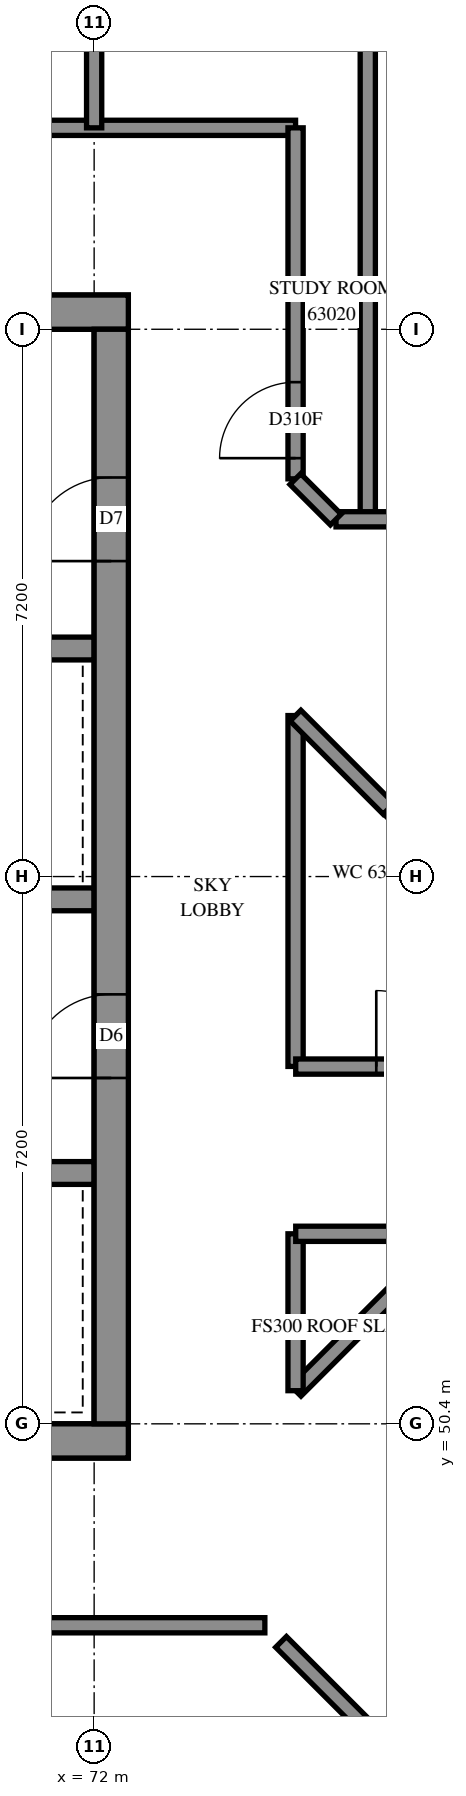
"""IFC4 building model, lengths in metres.
Left out: names, types, materials, properties, quantities, classifications, styles, units other than length and angle.
Written with IfcOpenShell. Run it as: python <this file> out.ifc"""

import sys

from ifc_helpers import new_model, si_unit, direction, frame, frame_2d, origin, place, context, subcontext, project, spatial, rectangle, extrude, element, fill, save


model = new_model("IFC4")
c1 = context("Model", 3, precision=1e-05, world=origin(), true_north=direction((0.0, 1.0)))
c2 = subcontext(c1, "Body", "Model", "MODEL_VIEW")
j1 = project(units=[si_unit("LENGTHUNIT", "METRE"), si_unit("PLANEANGLEUNIT", "RADIAN")], contexts=[c1])
p1 = place(None, origin())
s1 = spatial("IfcSite", under=j1, at=p1, CompositionType="ELEMENT")
p2 = place(p1, origin())
s2 = spatial("IfcBuilding", under=s1, at=p2, CompositionType="ELEMENT")
p3 = place(p2, frame((0.0, 0.0, 230.4)))
s3 = spatial("IfcBuildingStorey", under=s2, at=p3, CompositionType="ELEMENT", Elevation=230.4)
p4 = place(p3, frame((57.15, 50.175, -0.3), z_axis=(0.0, 0.0, 1.0), x_axis=(1.0, 0.0, 0.0)))
e1 = element("IfcWall", 1, at=p4, inside=s3, PredefinedType="SHEAR", context=c2, shape_type="SweptSolid", body=[
    extrude(rectangle(XDim=15.3, YDim=0.45, at=frame_2d((7.65, 0.0))), origin(), (0.0, 0.0, 1.0), 3.5),
])
p5 = place(p3, frame((57.15, 65.025, -0.3), z_axis=(0.0, 0.0, 1.0), x_axis=(1.0, 0.0, 0.0)))
e2 = element("IfcWall", 2, at=p5, inside=s3, PredefinedType="SHEAR", context=c2, shape_type="SweptSolid", body=[
    extrude(rectangle(XDim=15.3, YDim=0.45, at=frame_2d((7.65, 0.0))), origin(), (0.0, 0.0, 1.0), 3.5),
])
p6 = place(p5, frame((10.45, 0.0, 0.3)))
e3 = element("IfcOpeningElement", 3, at=p6, cuts=e2, PredefinedType="OPENING", context=c2, shape_type="SweptSolid", body=[
    extrude(rectangle(XDim=0.8, YDim=2.1, at=frame_2d((0.4, 1.05))), frame((0.0, 0.235, 0.0), z_axis=(0.0, -1.0, 0.0), x_axis=(1.0, 0.0, 0.0)), (0.0, 0.0, 1.0), 0.47),
])
p7 = place(p3, frame((72.225, 50.4, -0.3), z_axis=(0.0, 0.0, 1.0), x_axis=(0.0, 1.0, 0.0)))
e4 = element("IfcWall", 4, at=p7, inside=s3, PredefinedType="SHEAR", context=c2, shape_type="SweptSolid", body=[
    extrude(rectangle(XDim=14.4, YDim=0.45, at=frame_2d((7.2, 0.0))), origin(), (0.0, 0.0, 1.0), 3.5),
])
p8 = place(p7, frame((4.55, 0.0, 0.3)))
e5 = element("IfcOpeningElement", 5, at=p8, cuts=e4, PredefinedType="OPENING", context=c2, shape_type="SweptSolid", body=[
    extrude(rectangle(XDim=1.1, YDim=2.1, at=frame_2d((0.55, 1.05))), frame((0.0, 0.235, 0.0), z_axis=(0.0, -1.0, 0.0), x_axis=(1.0, 0.0, 0.0)), (0.0, 0.0, 1.0), 0.47),
])
p9 = place(p7, frame((11.35, 0.0, 0.3)))
e6 = element("IfcOpeningElement", 6, at=p9, cuts=e4, PredefinedType="OPENING", context=c2, shape_type="SweptSolid", body=[
    extrude(rectangle(XDim=1.1, YDim=2.1, at=frame_2d((0.55, 1.05))), frame((0.0, 0.235, 0.0), z_axis=(0.0, -1.0, 0.0), x_axis=(1.0, 0.0, 0.0)), (0.0, 0.0, 1.0), 0.47),
])
p10 = place(p3, frame((57.6, 53.7, 0.0), z_axis=(0.0, 0.0, 1.0), x_axis=(1.0, 0.0, 0.0)))
e7 = element("IfcWall", 7, at=p10, inside=s3, PredefinedType="SOLIDWALL", context=c2, shape_type="SweptSolid", body=[
    extrude(rectangle(XDim=14.4, YDim=0.3, at=frame_2d((7.2, 0.0))), origin(), (0.0, 0.0, 1.0), 3.9),
])
p11 = place(p10, frame((1.35, 0.0, 0.0)))
e8 = element("IfcOpeningElement", 8, at=p11, cuts=e7, PredefinedType="OPENING", context=c2, shape_type="SweptSolid", body=[
    extrude(rectangle(XDim=0.9, YDim=2.1, at=frame_2d((0.45, 1.05))), frame((0.0, 0.16, 0.0), z_axis=(0.0, -1.0, 0.0), x_axis=(1.0, 0.0, 0.0)), (0.0, 0.0, 1.0), 0.32),
])
p12 = place(p10, frame((4.95, 0.0, 0.0)))
e9 = element("IfcOpeningElement", 9, at=p12, cuts=e7, PredefinedType="OPENING", context=c2, shape_type="SweptSolid", body=[
    extrude(rectangle(XDim=0.9, YDim=2.1, at=frame_2d((0.45, 1.05))), frame((0.0, 0.16, 0.0), z_axis=(0.0, -1.0, 0.0), x_axis=(1.0, 0.0, 0.0)), (0.0, 0.0, 1.0), 0.32),
])
p13 = place(p10, frame((8.55, 0.0, 0.0)))
e10 = element("IfcOpeningElement", 10, at=p13, cuts=e7, PredefinedType="OPENING", context=c2, shape_type="SweptSolid", body=[
    extrude(rectangle(XDim=0.9, YDim=2.1, at=frame_2d((0.45, 1.05))), frame((0.0, 0.16, 0.0), z_axis=(0.0, -1.0, 0.0), x_axis=(1.0, 0.0, 0.0)), (0.0, 0.0, 1.0), 0.32),
])
p14 = place(p10, frame((12.05, 0.0, 0.0)))
e11 = element("IfcOpeningElement", 11, at=p14, cuts=e7, PredefinedType="OPENING", context=c2, shape_type="SweptSolid", body=[
    extrude(rectangle(XDim=1.1, YDim=2.1, at=frame_2d((0.55, 1.05))), frame((0.0, 0.16, 0.0), z_axis=(0.0, -1.0, 0.0), x_axis=(1.0, 0.0, 0.0)), (0.0, 0.0, 1.0), 0.32),
])
p15 = place(p3, frame((57.6, 57.3, 0.0), z_axis=(0.0, 0.0, 1.0), x_axis=(1.0, 0.0, 0.0)))
e12 = element("IfcWall", 12, at=p15, inside=s3, PredefinedType="SOLIDWALL", context=c2, shape_type="SweptSolid", body=[
    extrude(rectangle(XDim=14.4, YDim=0.3, at=frame_2d((7.2, 0.0))), origin(), (0.0, 0.0, 1.0), 3.9),
])
p16 = place(p15, frame((1.25, 0.0, 0.0)))
e13 = element("IfcOpeningElement", 13, at=p16, cuts=e12, PredefinedType="OPENING", context=c2, shape_type="SweptSolid", body=[
    extrude(rectangle(XDim=1.1, YDim=2.1, at=frame_2d((0.55, 1.05))), frame((0.0, 0.16, 0.0), z_axis=(0.0, -1.0, 0.0), x_axis=(1.0, 0.0, 0.0)), (0.0, 0.0, 1.0), 0.32),
])
p17 = place(p15, frame((4.85, 0.0, 0.0)))
e14 = element("IfcOpeningElement", 14, at=p17, cuts=e12, PredefinedType="OPENING", context=c2, shape_type="SweptSolid", body=[
    extrude(rectangle(XDim=1.1, YDim=2.1, at=frame_2d((0.55, 1.05))), frame((0.0, 0.16, 0.0), z_axis=(0.0, -1.0, 0.0), x_axis=(1.0, 0.0, 0.0)), (0.0, 0.0, 1.0), 0.32),
])
p18 = place(p15, frame((8.45, 0.0, 0.0)))
e15 = element("IfcOpeningElement", 15, at=p18, cuts=e12, PredefinedType="OPENING", context=c2, shape_type="SweptSolid", body=[
    extrude(rectangle(XDim=1.1, YDim=2.1, at=frame_2d((0.55, 1.05))), frame((0.0, 0.16, 0.0), z_axis=(0.0, -1.0, 0.0), x_axis=(1.0, 0.0, 0.0)), (0.0, 0.0, 1.0), 0.32),
])
p19 = place(p15, frame((12.05, 0.0, 0.0)))
e16 = element("IfcOpeningElement", 16, at=p19, cuts=e12, PredefinedType="OPENING", context=c2, shape_type="SweptSolid", body=[
    extrude(rectangle(XDim=1.1, YDim=2.1, at=frame_2d((0.55, 1.05))), frame((0.0, 0.16, 0.0), z_axis=(0.0, -1.0, 0.0), x_axis=(1.0, 0.0, 0.0)), (0.0, 0.0, 1.0), 0.32),
])
p20 = place(p3, frame((64.8, 60.6, 0.0), z_axis=(0.0, 0.0, 1.0), x_axis=(1.0, 0.0, 0.0)))
e17 = element("IfcWall", 17, at=p20, inside=s3, PredefinedType="SOLIDWALL", context=c2, shape_type="SweptSolid", body=[
    extrude(rectangle(XDim=7.2, YDim=0.3, at=frame_2d((3.6, 0.0))), origin(), (0.0, 0.0, 1.0), 3.9),
])
p21 = place(p3, frame((54.95, 67.45, 0.0), z_axis=(0.0, 0.0, 1.0), x_axis=(1.0, 0.0, 0.0)))
e18 = element("IfcWall", 18, at=p21, inside=s3, PredefinedType="PARTITIONING", context=c2, shape_type="SweptSolid", body=[
    extrude(rectangle(XDim=19.7, YDim=0.2, at=frame_2d((9.85, 0.0))), origin(), (0.0, 0.0, 1.0), 3.9),
])
p22 = place(p21, frame((6.513, 0.0, 0.0)))
e19 = element("IfcOpeningElement", 19, at=p22, cuts=e18, PredefinedType="OPENING", context=c2, shape_type="SweptSolid", body=[
    extrude(rectangle(XDim=1.0, YDim=2.1, at=frame_2d((0.5, 1.05))), frame((0.0, 0.11, 0.0), z_axis=(0.0, -1.0, 0.0), x_axis=(1.0, 0.0, 0.0)), (0.0, 0.0, 1.0), 0.22),
])
p23 = place(p21, frame((13.713, 0.0, 0.0)))
e20 = element("IfcOpeningElement", 20, at=p23, cuts=e18, PredefinedType="OPENING", context=c2, shape_type="SweptSolid", body=[
    extrude(rectangle(XDim=1.0, YDim=2.1, at=frame_2d((0.5, 1.05))), frame((0.0, 0.11, 0.0), z_axis=(0.0, -1.0, 0.0), x_axis=(1.0, 0.0, 0.0)), (0.0, 0.0, 1.0), 0.22),
])
p24 = place(p3, frame((54.95, 47.75, 0.0), z_axis=(0.0, 0.0, 1.0), x_axis=(1.0, 0.0, 0.0)))
e21 = element("IfcWall", 21, at=p24, inside=s3, PredefinedType="PARTITIONING", context=c2, shape_type="SweptSolid", body=[
    extrude(rectangle(XDim=19.296, YDim=0.2, at=frame_2d((9.648, 0.0))), origin(), (0.0, 0.0, 1.0), 3.9),
])
p25 = place(p24, frame((11.997, 0.0, 0.0)))
e22 = element("IfcOpeningElement", 22, at=p25, cuts=e21, PredefinedType="OPENING", context=c2, shape_type="SweptSolid", body=[
    extrude(rectangle(XDim=1.0, YDim=2.1, at=frame_2d((0.5, 1.05))), frame((0.0, 0.11, 0.0), z_axis=(0.0, -1.0, 0.0), x_axis=(1.0, 0.0, 0.0)), (0.0, 0.0, 1.0), 0.22),
])
p26 = place(p3, frame((75.6, 62.3, 0.0), z_axis=(0.0, 0.0, 1.0), x_axis=(0.0, 1.0, 0.0)))
e23 = element("IfcWall", 23, at=p26, inside=s3, PredefinedType="PARTITIONING", context=c2, shape_type="SweptSolid", body=[
    extrude(rectangle(XDim=6.57, YDim=0.2, at=frame_2d((3.285, 0.0))), origin(), (0.0, 0.0, 1.0), 3.9),
])
p27 = place(p3, frame((74.65, 62.832, 0.0), z_axis=(0.0, 0.0, 1.0), x_axis=(0.0, 1.0, 0.0)))
e24 = element("IfcWall", 24, at=p27, inside=s3, PredefinedType="PARTITIONING", context=c2, shape_type="SweptSolid", body=[
    extrude(rectangle(XDim=4.618, YDim=0.2, at=frame_2d((2.309, 0.0))), origin(), (0.0, 0.0, 1.0), 3.9),
])
p28 = place(p27, frame((0.272, 0.0, 0.0)))
e25 = element("IfcOpeningElement", 25, at=p28, cuts=e24, PredefinedType="OPENING", context=c2, shape_type="SweptSolid", body=[
    extrude(rectangle(XDim=1.0, YDim=2.1, at=frame_2d((0.5, 1.05))), frame((0.0, 0.11, 0.0), z_axis=(0.0, -1.0, 0.0), x_axis=(1.0, 0.0, 0.0)), (0.0, 0.0, 1.0), 0.22),
])
p29 = place(p3, frame((74.65, 55.102, 0.0), z_axis=(0.0, 0.0, 1.0), x_axis=(0.0, 1.0, 0.0)))
e26 = element("IfcWall", 26, at=p29, inside=s3, PredefinedType="PARTITIONING", context=c2, shape_type="SweptSolid", body=[
    extrude(rectangle(XDim=4.616, YDim=0.2, at=frame_2d((2.308, 0.0))), origin(), (0.0, 0.0, 1.0), 3.9),
])
p30 = place(p3, frame((74.652, 55.1, 0.0), z_axis=(0.0, 0.0, 1.0), x_axis=(1.0, 0.0, 0.0)))
e27 = element("IfcWall", 27, at=p30, inside=s3, PredefinedType="PARTITIONING", context=c2, shape_type="SweptSolid", body=[
    extrude(rectangle(XDim=4.616, YDim=0.2, at=frame_2d((2.308, 0.0))), origin(), (0.0, 0.0, 1.0), 3.9),
])
p31 = place(p30, frame((1.06, 0.0, 0.0)))
e28 = element("IfcOpeningElement", 28, at=p31, cuts=e27, PredefinedType="OPENING", context=c2, shape_type="SweptSolid", body=[
    extrude(rectangle(XDim=1.0, YDim=2.1, at=frame_2d((0.5, 1.05))), frame((0.0, 0.11, 0.0), z_axis=(0.0, -1.0, 0.0), x_axis=(1.0, 0.0, 0.0)), (0.0, 0.0, 1.0), 0.22),
])
p32 = place(p3, frame((75.182, 62.3, 0.0), z_axis=(0.0, 0.0, 1.0), x_axis=(1.0, 0.0, 0.0)))
e29 = element("IfcWall", 29, at=p32, inside=s3, PredefinedType="PARTITIONING", context=c2, shape_type="SweptSolid", body=[
    extrude(rectangle(XDim=4.018, YDim=0.2, at=frame_2d((2.009, 0.0))), origin(), (0.0, 0.0, 1.0), 3.9),
])
p33 = place(p3, frame((74.651, 50.835, 0.0), z_axis=(0.0, 0.0, 1.0), x_axis=(0.7071067812, 0.7071067812, 0.0)))
e30 = element("IfcWall", 30, at=p33, inside=s3, PredefinedType="PARTITIONING", context=c2, shape_type="SweptSolid", body=[
    extrude(rectangle(XDim=2.919, YDim=0.2, at=frame_2d((1.459, 0.0))), origin(), (0.0, 0.0, 1.0), 3.9),
])
p34 = place(p3, frame((75.878, 58.496, 0.0), z_axis=(0.0, 0.0, 1.0), x_axis=(0.7075293128, -0.706683997, 0.0)))
e31 = element("IfcWall", 31, at=p34, inside=s3, PredefinedType="PARTITIONING", context=c2, shape_type="SweptSolid", body=[
    extrude(rectangle(XDim=2.366, YDim=0.2, at=frame_2d((1.183, 0.0))), origin(), (0.0, 0.0, 1.0), 3.9),
])
p35 = place(p3, frame((74.65, 50.836, 0.0), z_axis=(0.0, 0.0, 1.0), x_axis=(0.0, 1.0, 0.0)))
e32 = element("IfcWall", 32, at=p35, inside=s3, PredefinedType="PARTITIONING", context=c2, shape_type="SweptSolid", body=[
    extrude(rectangle(XDim=2.064, YDim=0.2, at=frame_2d((1.032, 0.0))), origin(), (0.0, 0.0, 1.0), 3.9),
])
p36 = place(p3, frame((74.652, 52.9, 0.0), z_axis=(0.0, 0.0, 1.0), x_axis=(1.0, 0.0, 0.0)))
e33 = element("IfcWall", 33, at=p36, inside=s3, PredefinedType="PARTITIONING", context=c2, shape_type="SweptSolid", body=[
    extrude(rectangle(XDim=2.062, YDim=0.2, at=frame_2d((1.031, 0.0))), origin(), (0.0, 0.0, 1.0), 3.9),
])
p37 = place(p3, frame((74.649, 59.717, 0.0), z_axis=(0.0, 0.0, 1.0), x_axis=(0.7065293157, -0.7076837754, 0.0)))
e34 = element("IfcWall", 34, at=p37, inside=s3, PredefinedType="PARTITIONING", context=c2, shape_type="SweptSolid", body=[
    extrude(rectangle(XDim=1.732, YDim=0.2, at=frame_2d((0.866, 0.0))), origin(), (0.0, 0.0, 1.0), 3.9),
])
p38 = place(p3, frame((74.459, 47.531, 0.0), z_axis=(0.0, 0.0, 1.0), x_axis=(0.7071067812, -0.7071067812, 0.0)))
e35 = element("IfcWall", 35, at=p38, inside=s3, PredefinedType="PARTITIONING", context=c2, shape_type="SweptSolid", body=[
    extrude(rectangle(XDim=1.703, YDim=0.2, at=frame_2d((0.851, 0.0))), origin(), (0.0, 0.0, 1.0), 3.9),
])
p39 = place(p3, frame((72.0, 67.45, 0.0), z_axis=(0.0, 0.0, 1.0), x_axis=(0.0, 1.0, 0.0)))
e36 = element("IfcWall", 36, at=p39, inside=s3, PredefinedType="PARTITIONING", context=c2, shape_type="SweptSolid", body=[
    extrude(rectangle(XDim=1.42, YDim=0.2, at=frame_2d((0.71, 0.0))), origin(), (0.0, 0.0, 1.0), 3.9),
])
p40 = place(p3, frame((74.647, 62.829, 0.0), z_axis=(0.0, 0.0, 1.0), x_axis=(0.7071067812, -0.7071067812, 0.0)))
e37 = element("IfcWall", 37, at=p40, inside=s3, PredefinedType="PARTITIONING", context=c2, shape_type="SweptSolid", body=[
    extrude(rectangle(XDim=0.752, YDim=0.2, at=frame_2d((0.376, 0.0))), origin(), (0.0, 0.0, 1.0), 3.9),
])
p41 = place(p8, origin())
e38 = element("IfcDoor", 38, at=p41, inside=s3, OperationType="DOUBLE_DOOR_SINGLE_SWING", PredefinedType="DOOR", context=c2, shape_type="SweptSolid", body=[
    extrude(rectangle(XDim=1.1, YDim=2.1, at=frame_2d((0.55, 1.05))), frame((0.0, 0.025, 0.0), z_axis=(0.0, -1.0, 0.0), x_axis=(1.0, 0.0, 0.0)), (0.0, 0.0, 1.0), 0.05),
])
fill(e5, e38)
p42 = place(p9, origin())
e39 = element("IfcDoor", 39, at=p42, inside=s3, OperationType="SINGLE_SWING_RIGHT", PredefinedType="DOOR", context=c2, shape_type="SweptSolid", body=[
    extrude(rectangle(XDim=1.1, YDim=2.1, at=frame_2d((0.55, 1.05))), frame((0.0, 0.025, 0.0), z_axis=(0.0, -1.0, 0.0), x_axis=(1.0, 0.0, 0.0)), (0.0, 0.0, 1.0), 0.05),
])
fill(e6, e39)
p43 = place(p31, origin())
e40 = element("IfcDoor", 40, at=p43, inside=s3, OperationType="SINGLE_SWING_LEFT", PredefinedType="DOOR", context=c2, shape_type="SweptSolid", body=[
    extrude(rectangle(XDim=1.0, YDim=2.1, at=frame_2d((0.5, 1.05))), frame((0.0, 0.025, 0.0), z_axis=(0.0, -1.0, 0.0), x_axis=(1.0, 0.0, 0.0)), (0.0, 0.0, 1.0), 0.05),
])
fill(e28, e40)
p44 = place(p28, origin())
e41 = element("IfcDoor", 41, at=p44, inside=s3, OperationType="SINGLE_SWING_RIGHT", PredefinedType="DOOR", context=c2, shape_type="SweptSolid", body=[
    extrude(rectangle(XDim=1.0, YDim=2.1, at=frame_2d((0.5, 1.05))), frame((0.0, 0.025, 0.0), z_axis=(0.0, -1.0, 0.0), x_axis=(1.0, 0.0, 0.0)), (0.0, 0.0, 1.0), 0.05),
])
fill(e25, e41)
save(model, sys.argv[1])
